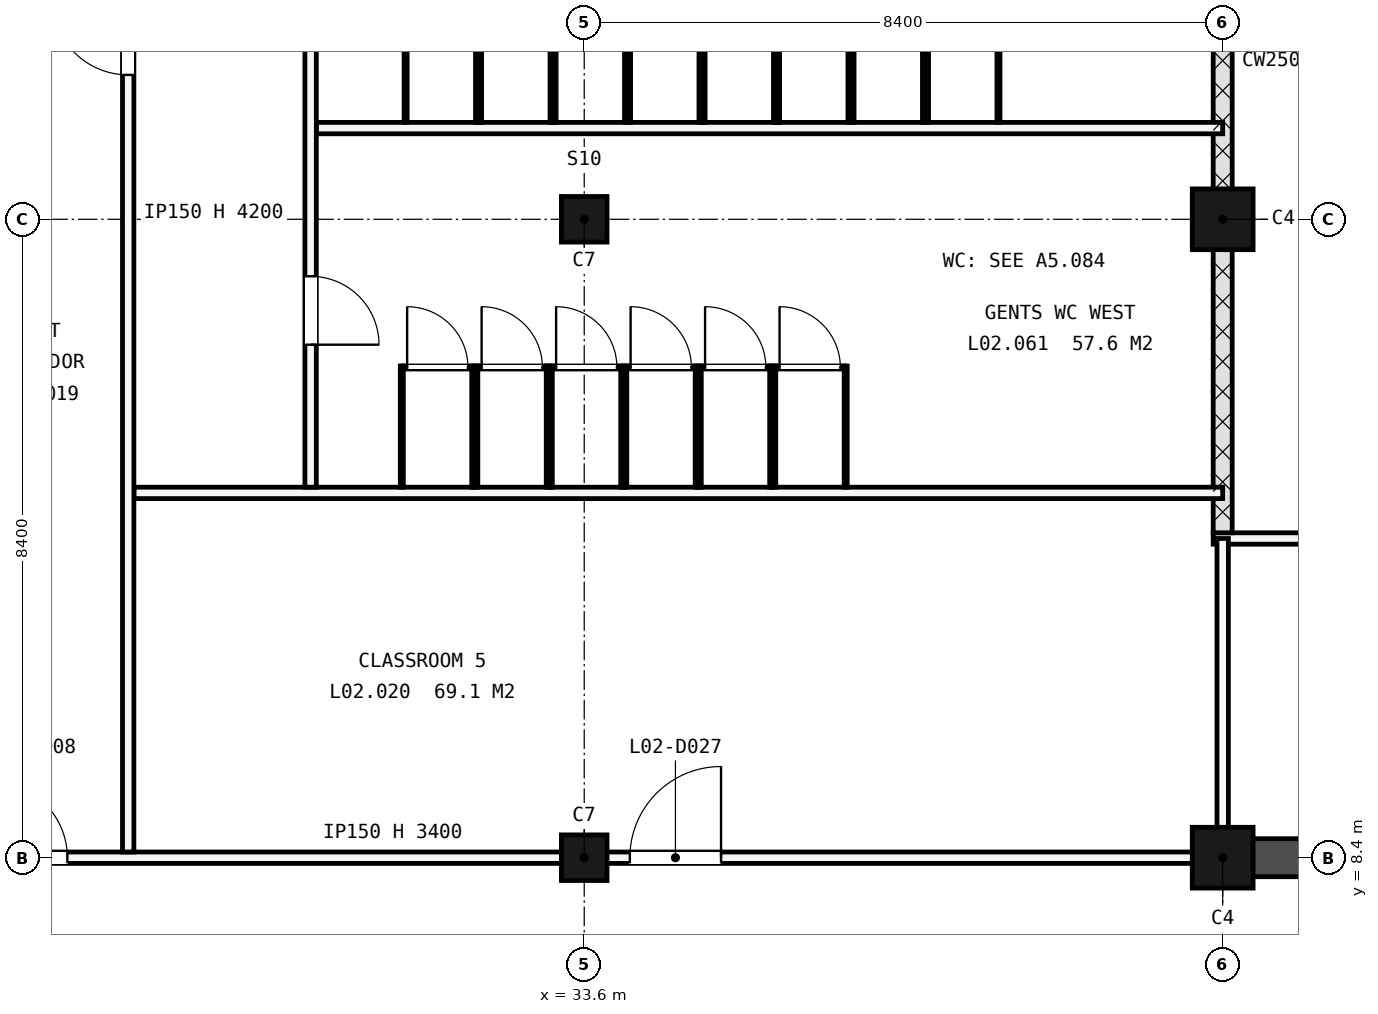
"""IFC4 building model, lengths in metres.
Left out: names, types, materials, properties, quantities, classifications, styles, units other than length and angle.
Written with IfcOpenShell. Run it as: python <this file> out.ifc"""

import sys

from ifc_helpers import new_model, si_unit, direction, frame, frame_2d, origin, origin_2d, place, context, subcontext, project, spatial, rectangle, extrude, element, fill, save


model = new_model("IFC4")
c1 = context("Model", 3, precision=1e-05, world=origin(), true_north=direction((0.0, 1.0)))
c2 = subcontext(c1, "Body", "Model", "MODEL_VIEW")
j1 = project(units=[si_unit("LENGTHUNIT", "METRE"), si_unit("PLANEANGLEUNIT", "RADIAN")], contexts=[c1])
p1 = place(None, origin())
s1 = spatial("IfcSite", under=j1, at=p1, CompositionType="ELEMENT")
p2 = place(p1, origin())
s2 = spatial("IfcBuilding", under=s1, at=p2, CompositionType="ELEMENT")
p3 = place(p2, frame((0.0, 0.0, 9.9)))
s3 = spatial("IfcBuildingStorey", under=s2, at=p3, CompositionType="ELEMENT", Elevation=9.9)
for number, where, z_axis, x_axis in (
    (1, (33.6, 8.4, -0.25), (0.0, 0.0, 1.0), (1.0, 0.0, 0.0)),
    (2, (33.6, 16.8, -0.25), (0.0, 0.0, 1.0), (1.0, 0.0, 0.0)),
):
    element("IfcColumn", number, at=place(p3, frame(where, z_axis=z_axis, x_axis=x_axis)), inside=s3, PredefinedType="COLUMN", context=c2, shape_type="SweptSolid", body=[
        extrude(rectangle(XDim=0.6, YDim=0.6, at=origin_2d()), origin(), (0.0, 0.0, 1.0), 4.45),
    ])
for number, where, z_axis, x_axis in (
    (3, (42.0, 8.4, -0.25), (0.0, 0.0, 1.0), (1.0, 0.0, 0.0)),
    (4, (42.0, 16.8, -0.25), (0.0, 0.0, 1.0), (1.0, 0.0, 0.0)),
):
    element("IfcColumn", number, at=place(p3, frame(where, z_axis=z_axis, x_axis=x_axis)), inside=s3, PredefinedType="COLUMN", context=c2, shape_type="SweptSolid", body=[
        extrude(rectangle(XDim=0.8, YDim=0.8, at=origin_2d()), origin(), (0.0, 0.0, 1.0), 4.45),
    ])
p4 = place(p3, frame((42.0, 8.4, -0.25), z_axis=(0.0, 0.0, 1.0), x_axis=(1.0, 0.0, 0.0)))
e5 = element("IfcWall", 5, at=p4, inside=s3, PredefinedType="SHEAR", context=c2, shape_type="SweptSolid", body=[
    extrude(rectangle(XDim=42.0, YDim=0.5, at=frame_2d((21.0, 0.0))), origin(), (0.0, 0.0, 1.0), 4.45),
])
p5 = place(p3, frame((41.875, 12.6, -0.3), z_axis=(0.0, 0.0, 1.0), x_axis=(1.0, 0.0, 0.0)))
e6 = element("IfcWall", 6, at=p5, inside=s3, PredefinedType="PARTITIONING", context=c2, shape_type="SweptSolid", body=[
    extrude(rectangle(XDim=42.025, YDim=0.15, at=frame_2d((21.012, 0.0))), origin(), (0.0, 0.0, 1.0), 4.5),
])
p6 = place(p3, frame((42.0, 12.675, -0.3), z_axis=(0.0, 0.0, 1.0), x_axis=(0.0, 1.0, 0.0)))
e7 = element("IfcWall", 7, at=p6, inside=s3, PredefinedType="SOLIDWALL", context=c2, shape_type="SweptSolid", body=[
    extrude(rectangle(XDim=12.425, YDim=0.25, at=frame_2d((6.212, 0.0))), origin(), (0.0, 0.0, 1.0), 4.5),
])
p7 = place(p3, frame((42.0, 8.65, -0.3), z_axis=(0.0, 0.0, 1.0), x_axis=(0.0, 1.0, 0.0)))
e8 = element("IfcWall", 8, at=p7, inside=s3, PredefinedType="PARTITIONING", context=c2, shape_type="SweptSolid", body=[
    extrude(rectangle(XDim=3.95, YDim=0.15, at=frame_2d((1.975, 0.0))), origin(), (0.0, 0.0, 1.0), 4.5),
])
p8 = place(p3, frame((25.2, 8.4, 0.0), z_axis=(0.0, 0.0, 1.0), x_axis=(1.0, 0.0, 0.0)))
e9 = element("IfcWall", 9, at=p8, inside=s3, PredefinedType="PARTITIONING", context=c2, shape_type="SweptSolid", body=[
    extrude(rectangle(XDim=16.8, YDim=0.15, at=frame_2d((8.4, 0.0))), origin(), (0.0, 0.0, 1.0), 3.4),
])
p9 = place(p8, frame((9.0, 0.0, 0.0)))
e10 = element("IfcOpeningElement", 10, at=p9, cuts=e9, PredefinedType="OPENING", context=c2, shape_type="SweptSolid", body=[
    extrude(rectangle(XDim=1.2, YDim=2.1, at=frame_2d((0.6, 1.05))), frame((0.0, 0.085, 0.0), z_axis=(0.0, -1.0, 0.0), x_axis=(1.0, 0.0, 0.0)), (0.0, 0.0, 1.0), 0.17),
])
p10 = place(p8, frame((0.6, 0.0, 0.0)))
e11 = element("IfcOpeningElement", 11, at=p10, cuts=e9, PredefinedType="OPENING", context=c2, shape_type="SweptSolid", body=[
    extrude(rectangle(XDim=1.0, YDim=2.1, at=frame_2d((0.5, 1.05))), frame((0.0, 0.085, 0.0), z_axis=(0.0, -1.0, 0.0), x_axis=(1.0, 0.0, 0.0)), (0.0, 0.0, 1.0), 0.17),
])
p11 = place(p3, frame((27.675, 13.2, 0.0), z_axis=(0.0, 0.0, 1.0), x_axis=(1.0, 0.0, 0.0)))
e12 = element("IfcWall", 12, at=p11, inside=s3, PredefinedType="PARTITIONING", context=c2, shape_type="SweptSolid", body=[
    extrude(rectangle(XDim=14.325, YDim=0.15, at=frame_2d((7.163, 0.0))), origin(), (0.0, 0.0, 1.0), 4.2),
])
p12 = place(p3, frame((30.075, 18.0, 0.0), z_axis=(0.0, 0.0, 1.0), x_axis=(1.0, 0.0, 0.0)))
e13 = element("IfcWall", 13, at=p12, inside=s3, PredefinedType="PARTITIONING", context=c2, shape_type="SweptSolid", body=[
    extrude(rectangle(XDim=11.925, YDim=0.15, at=frame_2d((5.962, 0.0))), origin(), (0.0, 0.0, 1.0), 4.2),
])
p13 = place(p3, frame((27.6, 8.475, 0.0), z_axis=(0.0, 0.0, 1.0), x_axis=(0.0, 1.0, 0.0)))
e14 = element("IfcWall", 14, at=p13, inside=s3, PredefinedType="PARTITIONING", context=c2, shape_type="SweptSolid", body=[
    extrude(rectangle(XDim=16.825, YDim=0.15, at=frame_2d((8.413, 0.0))), origin(), (0.0, 0.0, 1.0), 4.2),
])
p14 = place(p13, frame((10.225, 0.0, 0.0)))
e15 = element("IfcOpeningElement", 15, at=p14, cuts=e14, PredefinedType="OPENING", context=c2, shape_type="SweptSolid", body=[
    extrude(rectangle(XDim=1.0, YDim=2.1, at=frame_2d((0.5, 1.05))), frame((0.0, 0.085, 0.0), z_axis=(0.0, -1.0, 0.0), x_axis=(1.0, 0.0, 0.0)), (0.0, 0.0, 1.0), 0.17),
])
p15 = place(p3, frame((30.0, 13.275, 0.0), z_axis=(0.0, 0.0, 1.0), x_axis=(0.0, 1.0, 0.0)))
e16 = element("IfcWall", 16, at=p15, inside=s3, PredefinedType="PARTITIONING", context=c2, shape_type="SweptSolid", body=[
    extrude(rectangle(XDim=11.825, YDim=0.15, at=frame_2d((5.913, 0.0))), origin(), (0.0, 0.0, 1.0), 4.2),
])
p16 = place(p15, frame((1.875, 0.0, 0.0)))
e17 = element("IfcOpeningElement", 17, at=p16, cuts=e16, PredefinedType="OPENING", context=c2, shape_type="SweptSolid", body=[
    extrude(rectangle(XDim=0.9, YDim=2.1, at=frame_2d((0.45, 1.05))), frame((0.0, 0.085, 0.0), z_axis=(0.0, -1.0, 0.0), x_axis=(1.0, 0.0, 0.0)), (0.0, 0.0, 1.0), 0.17),
])
p17 = place(p15, frame((6.575, 0.0, 0.0)))
e18 = element("IfcOpeningElement", 18, at=p17, cuts=e16, PredefinedType="OPENING", context=c2, shape_type="SweptSolid", body=[
    extrude(rectangle(XDim=0.9, YDim=2.1, at=frame_2d((0.45, 1.05))), frame((0.0, 0.085, 0.0), z_axis=(0.0, -1.0, 0.0), x_axis=(1.0, 0.0, 0.0)), (0.0, 0.0, 1.0), 0.17),
])
p18 = place(p15, frame((10.1, 0.0, 0.0)))
e19 = element("IfcOpeningElement", 19, at=p18, cuts=e16, PredefinedType="OPENING", context=c2, shape_type="SweptSolid", body=[
    extrude(rectangle(XDim=1.05, YDim=2.25, at=frame_2d((0.525, 1.125))), frame((0.0, 0.085, 0.0), z_axis=(0.0, -1.0, 0.0), x_axis=(1.0, 0.0, 0.0)), (0.0, 0.0, 1.0), 0.17),
])
for number, where, z_axis, x_axis in (
    (20, (31.2, 13.275, 0.0), (0.0, 0.0, 1.0), (0.0, 1.0, 0.0)),
    (21, (32.14, 13.275, 0.0), (0.0, 0.0, 1.0), (0.0, 1.0, 0.0)),
):
    element("IfcWall", number, at=place(p3, frame(where, z_axis=z_axis, x_axis=x_axis)), inside=s3, PredefinedType="PARTITIONING", context=c2, shape_type="SweptSolid", body=[
        extrude(rectangle(XDim=1.595, YDim=0.04, at=frame_2d((0.798, 0.0))), origin(), (0.0, 0.0, 1.0), 2.0),
    ])
p19 = place(p3, frame((31.22, 14.85, 0.0), z_axis=(0.0, 0.0, 1.0), x_axis=(1.0, 0.0, 0.0)))
e22 = element("IfcWall", 22, at=p19, inside=s3, PredefinedType="PARTITIONING", context=c2, shape_type="SweptSolid", body=[
    extrude(rectangle(XDim=0.9, YDim=0.04, at=frame_2d((0.45, 0.0))), origin(), (0.0, 0.0, 1.0), 2.0),
])
p20 = place(p19, frame((0.05, 0.0, 0.0)))
e23 = element("IfcOpeningElement", 23, at=p20, cuts=e22, PredefinedType="OPENING", context=c2, shape_type="SweptSolid", body=[
    extrude(rectangle(XDim=0.8, YDim=2.0, at=frame_2d((0.4, 1.0))), frame((0.0, 0.03, 0.0), z_axis=(0.0, -1.0, 0.0), x_axis=(1.0, 0.0, 0.0)), (0.0, 0.0, 1.0), 0.06),
])
for number, where, z_axis, x_axis in (
    (24, (32.18, 13.275, 0.0), (0.0, 0.0, 1.0), (0.0, 1.0, 0.0)),
    (25, (33.12, 13.275, 0.0), (0.0, 0.0, 1.0), (0.0, 1.0, 0.0)),
):
    element("IfcWall", number, at=place(p3, frame(where, z_axis=z_axis, x_axis=x_axis)), inside=s3, PredefinedType="PARTITIONING", context=c2, shape_type="SweptSolid", body=[
        extrude(rectangle(XDim=1.595, YDim=0.04, at=frame_2d((0.798, 0.0))), origin(), (0.0, 0.0, 1.0), 2.0),
    ])
p21 = place(p3, frame((32.2, 14.85, 0.0), z_axis=(0.0, 0.0, 1.0), x_axis=(1.0, 0.0, 0.0)))
e26 = element("IfcWall", 26, at=p21, inside=s3, PredefinedType="PARTITIONING", context=c2, shape_type="SweptSolid", body=[
    extrude(rectangle(XDim=0.9, YDim=0.04, at=frame_2d((0.45, 0.0))), origin(), (0.0, 0.0, 1.0), 2.0),
])
p22 = place(p21, frame((0.05, 0.0, 0.0)))
e27 = element("IfcOpeningElement", 27, at=p22, cuts=e26, PredefinedType="OPENING", context=c2, shape_type="SweptSolid", body=[
    extrude(rectangle(XDim=0.8, YDim=2.0, at=frame_2d((0.4, 1.0))), frame((0.0, 0.03, 0.0), z_axis=(0.0, -1.0, 0.0), x_axis=(1.0, 0.0, 0.0)), (0.0, 0.0, 1.0), 0.06),
])
for number, where, z_axis, x_axis in (
    (28, (33.16, 13.275, 0.0), (0.0, 0.0, 1.0), (0.0, 1.0, 0.0)),
    (29, (34.1, 13.275, 0.0), (0.0, 0.0, 1.0), (0.0, 1.0, 0.0)),
):
    element("IfcWall", number, at=place(p3, frame(where, z_axis=z_axis, x_axis=x_axis)), inside=s3, PredefinedType="PARTITIONING", context=c2, shape_type="SweptSolid", body=[
        extrude(rectangle(XDim=1.595, YDim=0.04, at=frame_2d((0.798, 0.0))), origin(), (0.0, 0.0, 1.0), 2.0),
    ])
p23 = place(p3, frame((33.18, 14.85, 0.0), z_axis=(0.0, 0.0, 1.0), x_axis=(1.0, 0.0, 0.0)))
e30 = element("IfcWall", 30, at=p23, inside=s3, PredefinedType="PARTITIONING", context=c2, shape_type="SweptSolid", body=[
    extrude(rectangle(XDim=0.9, YDim=0.04, at=frame_2d((0.45, 0.0))), origin(), (0.0, 0.0, 1.0), 2.0),
])
p24 = place(p23, frame((0.05, 0.0, 0.0)))
e31 = element("IfcOpeningElement", 31, at=p24, cuts=e30, PredefinedType="OPENING", context=c2, shape_type="SweptSolid", body=[
    extrude(rectangle(XDim=0.8, YDim=2.0, at=frame_2d((0.4, 1.0))), frame((0.0, 0.03, 0.0), z_axis=(0.0, -1.0, 0.0), x_axis=(1.0, 0.0, 0.0)), (0.0, 0.0, 1.0), 0.06),
])
for number, where, z_axis, x_axis in (
    (32, (34.14, 13.275, 0.0), (0.0, 0.0, 1.0), (0.0, 1.0, 0.0)),
    (33, (35.08, 13.275, 0.0), (0.0, 0.0, 1.0), (0.0, 1.0, 0.0)),
):
    element("IfcWall", number, at=place(p3, frame(where, z_axis=z_axis, x_axis=x_axis)), inside=s3, PredefinedType="PARTITIONING", context=c2, shape_type="SweptSolid", body=[
        extrude(rectangle(XDim=1.595, YDim=0.04, at=frame_2d((0.798, 0.0))), origin(), (0.0, 0.0, 1.0), 2.0),
    ])
p25 = place(p3, frame((34.16, 14.85, 0.0), z_axis=(0.0, 0.0, 1.0), x_axis=(1.0, 0.0, 0.0)))
e34 = element("IfcWall", 34, at=p25, inside=s3, PredefinedType="PARTITIONING", context=c2, shape_type="SweptSolid", body=[
    extrude(rectangle(XDim=0.9, YDim=0.04, at=frame_2d((0.45, 0.0))), origin(), (0.0, 0.0, 1.0), 2.0),
])
p26 = place(p25, frame((0.05, 0.0, 0.0)))
e35 = element("IfcOpeningElement", 35, at=p26, cuts=e34, PredefinedType="OPENING", context=c2, shape_type="SweptSolid", body=[
    extrude(rectangle(XDim=0.8, YDim=2.0, at=frame_2d((0.4, 1.0))), frame((0.0, 0.03, 0.0), z_axis=(0.0, -1.0, 0.0), x_axis=(1.0, 0.0, 0.0)), (0.0, 0.0, 1.0), 0.06),
])
for number, where, z_axis, x_axis in (
    (36, (35.12, 13.275, 0.0), (0.0, 0.0, 1.0), (0.0, 1.0, 0.0)),
    (37, (36.06, 13.275, 0.0), (0.0, 0.0, 1.0), (0.0, 1.0, 0.0)),
):
    element("IfcWall", number, at=place(p3, frame(where, z_axis=z_axis, x_axis=x_axis)), inside=s3, PredefinedType="PARTITIONING", context=c2, shape_type="SweptSolid", body=[
        extrude(rectangle(XDim=1.595, YDim=0.04, at=frame_2d((0.798, 0.0))), origin(), (0.0, 0.0, 1.0), 2.0),
    ])
p27 = place(p3, frame((35.14, 14.85, 0.0), z_axis=(0.0, 0.0, 1.0), x_axis=(1.0, 0.0, 0.0)))
e38 = element("IfcWall", 38, at=p27, inside=s3, PredefinedType="PARTITIONING", context=c2, shape_type="SweptSolid", body=[
    extrude(rectangle(XDim=0.9, YDim=0.04, at=frame_2d((0.45, 0.0))), origin(), (0.0, 0.0, 1.0), 2.0),
])
p28 = place(p27, frame((0.05, 0.0, 0.0)))
e39 = element("IfcOpeningElement", 39, at=p28, cuts=e38, PredefinedType="OPENING", context=c2, shape_type="SweptSolid", body=[
    extrude(rectangle(XDim=0.8, YDim=2.0, at=frame_2d((0.4, 1.0))), frame((0.0, 0.03, 0.0), z_axis=(0.0, -1.0, 0.0), x_axis=(1.0, 0.0, 0.0)), (0.0, 0.0, 1.0), 0.06),
])
for number, where, z_axis, x_axis in (
    (40, (36.1, 13.275, 0.0), (0.0, 0.0, 1.0), (0.0, 1.0, 0.0)),
    (41, (37.04, 13.275, 0.0), (0.0, 0.0, 1.0), (0.0, 1.0, 0.0)),
):
    element("IfcWall", number, at=place(p3, frame(where, z_axis=z_axis, x_axis=x_axis)), inside=s3, PredefinedType="PARTITIONING", context=c2, shape_type="SweptSolid", body=[
        extrude(rectangle(XDim=1.595, YDim=0.04, at=frame_2d((0.798, 0.0))), origin(), (0.0, 0.0, 1.0), 2.0),
    ])
p29 = place(p3, frame((36.12, 14.85, 0.0), z_axis=(0.0, 0.0, 1.0), x_axis=(1.0, 0.0, 0.0)))
e42 = element("IfcWall", 42, at=p29, inside=s3, PredefinedType="PARTITIONING", context=c2, shape_type="SweptSolid", body=[
    extrude(rectangle(XDim=0.9, YDim=0.04, at=frame_2d((0.45, 0.0))), origin(), (0.0, 0.0, 1.0), 2.0),
])
p30 = place(p29, frame((0.05, 0.0, 0.0)))
e43 = element("IfcOpeningElement", 43, at=p30, cuts=e42, PredefinedType="OPENING", context=c2, shape_type="SweptSolid", body=[
    extrude(rectangle(XDim=0.8, YDim=2.0, at=frame_2d((0.4, 1.0))), frame((0.0, 0.03, 0.0), z_axis=(0.0, -1.0, 0.0), x_axis=(1.0, 0.0, 0.0)), (0.0, 0.0, 1.0), 0.06),
])
for number, where, z_axis, x_axis in (
    (44, (31.25, 18.075, 0.0), (0.0, 0.0, 1.0), (0.0, 1.0, 0.0)),
    (45, (32.19, 18.075, 0.0), (0.0, 0.0, 1.0), (0.0, 1.0, 0.0)),
    (46, (32.23, 18.075, 0.0), (0.0, 0.0, 1.0), (0.0, 1.0, 0.0)),
    (47, (33.17, 18.075, 0.0), (0.0, 0.0, 1.0), (0.0, 1.0, 0.0)),
    (48, (33.21, 18.075, 0.0), (0.0, 0.0, 1.0), (0.0, 1.0, 0.0)),
    (49, (34.15, 18.075, 0.0), (0.0, 0.0, 1.0), (0.0, 1.0, 0.0)),
    (50, (34.19, 18.075, 0.0), (0.0, 0.0, 1.0), (0.0, 1.0, 0.0)),
    (51, (35.13, 18.075, 0.0), (0.0, 0.0, 1.0), (0.0, 1.0, 0.0)),
    (52, (35.17, 18.075, 0.0), (0.0, 0.0, 1.0), (0.0, 1.0, 0.0)),
    (53, (36.11, 18.075, 0.0), (0.0, 0.0, 1.0), (0.0, 1.0, 0.0)),
    (54, (36.15, 18.075, 0.0), (0.0, 0.0, 1.0), (0.0, 1.0, 0.0)),
    (55, (37.09, 18.075, 0.0), (0.0, 0.0, 1.0), (0.0, 1.0, 0.0)),
    (56, (37.13, 18.075, 0.0), (0.0, 0.0, 1.0), (0.0, 1.0, 0.0)),
    (57, (38.07, 18.075, 0.0), (0.0, 0.0, 1.0), (0.0, 1.0, 0.0)),
    (58, (38.11, 18.075, 0.0), (0.0, 0.0, 1.0), (0.0, 1.0, 0.0)),
    (59, (39.05, 18.075, 0.0), (0.0, 0.0, 1.0), (0.0, 1.0, 0.0)),
):
    element("IfcWall", number, at=place(p3, frame(where, z_axis=z_axis, x_axis=x_axis)), inside=s3, PredefinedType="PARTITIONING", context=c2, shape_type="SweptSolid", body=[
        extrude(rectangle(XDim=1.595, YDim=0.04, at=frame_2d((0.797, 0.0))), origin(), (0.0, 0.0, 1.0), 2.0),
    ])
p31 = place(p9, origin())
e60 = element("IfcDoor", 60, at=p31, inside=s3, OperationType="SINGLE_SWING_LEFT", PredefinedType="DOOR", context=c2, shape_type="SweptSolid", body=[
    extrude(rectangle(XDim=1.2, YDim=2.1, at=frame_2d((0.6, 1.05))), frame((0.0, 0.025, 0.0), z_axis=(0.0, -1.0, 0.0), x_axis=(1.0, 0.0, 0.0)), (0.0, 0.0, 1.0), 0.05),
])
fill(e10, e60)
p32 = place(p16, origin())
e61 = element("IfcDoor", 61, at=p32, inside=s3, OperationType="SINGLE_SWING_LEFT", PredefinedType="DOOR", context=c2, shape_type="SweptSolid", body=[
    extrude(rectangle(XDim=0.9, YDim=2.1, at=frame_2d((0.45, 1.05))), frame((0.0, 0.025, 0.0), z_axis=(0.0, -1.0, 0.0), x_axis=(1.0, 0.0, 0.0)), (0.0, 0.0, 1.0), 0.05),
])
fill(e17, e61)
p33 = place(p14, origin())
e62 = element("IfcDoor", 62, at=p33, inside=s3, OperationType="SINGLE_SWING_LEFT", PredefinedType="DOOR", context=c2, shape_type="SweptSolid", body=[
    extrude(rectangle(XDim=1.0, YDim=2.1, at=frame_2d((0.5, 1.05))), frame((0.0, 0.025, 0.0), z_axis=(0.0, -1.0, 0.0), x_axis=(1.0, 0.0, 0.0)), (0.0, 0.0, 1.0), 0.05),
])
fill(e15, e62)
p34 = place(p10, origin())
e63 = element("IfcDoor", 63, at=p34, inside=s3, OperationType="SINGLE_SWING_RIGHT", PredefinedType="DOOR", context=c2, shape_type="SweptSolid", body=[
    extrude(rectangle(XDim=1.0, YDim=2.1, at=frame_2d((0.5, 1.05))), frame((0.0, 0.025, 0.0), z_axis=(0.0, -1.0, 0.0), x_axis=(1.0, 0.0, 0.0)), (0.0, 0.0, 1.0), 0.05),
])
fill(e11, e63)
p35 = place(p20, origin())
e64 = element("IfcDoor", 64, at=p35, inside=s3, OperationType="SINGLE_SWING_LEFT", PredefinedType="DOOR", context=c2, shape_type="SweptSolid", body=[
    extrude(rectangle(XDim=0.8, YDim=2.0, at=frame_2d((0.4, 1.0))), frame((0.0, 0.02, 0.0), z_axis=(0.0, -1.0, 0.0), x_axis=(1.0, 0.0, 0.0)), (0.0, 0.0, 1.0), 0.04),
])
fill(e23, e64)
p36 = place(p22, origin())
e65 = element("IfcDoor", 65, at=p36, inside=s3, OperationType="SINGLE_SWING_LEFT", PredefinedType="DOOR", context=c2, shape_type="SweptSolid", body=[
    extrude(rectangle(XDim=0.8, YDim=2.0, at=frame_2d((0.4, 1.0))), frame((0.0, 0.02, 0.0), z_axis=(0.0, -1.0, 0.0), x_axis=(1.0, 0.0, 0.0)), (0.0, 0.0, 1.0), 0.04),
])
fill(e27, e65)
p37 = place(p24, origin())
e66 = element("IfcDoor", 66, at=p37, inside=s3, OperationType="SINGLE_SWING_LEFT", PredefinedType="DOOR", context=c2, shape_type="SweptSolid", body=[
    extrude(rectangle(XDim=0.8, YDim=2.0, at=frame_2d((0.4, 1.0))), frame((0.0, 0.02, 0.0), z_axis=(0.0, -1.0, 0.0), x_axis=(1.0, 0.0, 0.0)), (0.0, 0.0, 1.0), 0.04),
])
fill(e31, e66)
p38 = place(p26, origin())
e67 = element("IfcDoor", 67, at=p38, inside=s3, OperationType="SINGLE_SWING_LEFT", PredefinedType="DOOR", context=c2, shape_type="SweptSolid", body=[
    extrude(rectangle(XDim=0.8, YDim=2.0, at=frame_2d((0.4, 1.0))), frame((0.0, 0.02, 0.0), z_axis=(0.0, -1.0, 0.0), x_axis=(1.0, 0.0, 0.0)), (0.0, 0.0, 1.0), 0.04),
])
fill(e35, e67)
p39 = place(p28, origin())
e68 = element("IfcDoor", 68, at=p39, inside=s3, OperationType="SINGLE_SWING_LEFT", PredefinedType="DOOR", context=c2, shape_type="SweptSolid", body=[
    extrude(rectangle(XDim=0.8, YDim=2.0, at=frame_2d((0.4, 1.0))), frame((0.0, 0.02, 0.0), z_axis=(0.0, -1.0, 0.0), x_axis=(1.0, 0.0, 0.0)), (0.0, 0.0, 1.0), 0.04),
])
fill(e39, e68)
p40 = place(p30, origin())
e69 = element("IfcDoor", 69, at=p40, inside=s3, OperationType="SINGLE_SWING_LEFT", PredefinedType="DOOR", context=c2, shape_type="SweptSolid", body=[
    extrude(rectangle(XDim=0.8, YDim=2.0, at=frame_2d((0.4, 1.0))), frame((0.0, 0.02, 0.0), z_axis=(0.0, -1.0, 0.0), x_axis=(1.0, 0.0, 0.0)), (0.0, 0.0, 1.0), 0.04),
])
fill(e43, e69)
save(model, sys.argv[1])
